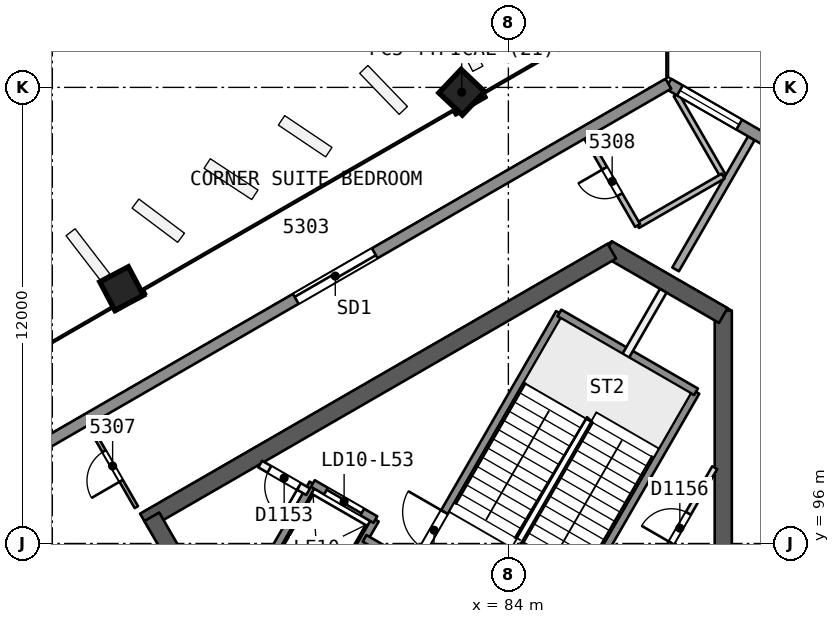
"""IFC4 building model, lengths in metres.
Left out: names, types, materials, properties, quantities, classifications, styles, units other than length and angle.
Written with IfcOpenShell. Run it as: python <this file> out.ifc"""

import sys

from ifc_helpers import new_model, si_unit, direction, frame, frame_2d, origin, origin_2d, place, context, subcontext, project, spatial, rectangle, extrude, element, fill, save


model = new_model("IFC4")
c1 = context("Model", 3, precision=1e-05, world=origin(), true_north=direction((0.0, 1.0)))
c2 = subcontext(c1, "Body", "Model", "MODEL_VIEW")
j1 = project(units=[si_unit("LENGTHUNIT", "METRE"), si_unit("PLANEANGLEUNIT", "RADIAN")], contexts=[c1])
p1 = place(None, origin())
s1 = spatial("IfcSite", under=j1, at=p1, CompositionType="ELEMENT")
p2 = place(p1, origin())
s2 = spatial("IfcBuilding", under=s1, at=p2, CompositionType="ELEMENT")
p3 = place(p2, frame((0.0, 0.0, 216.9)))
s3 = spatial("IfcBuildingStorey", under=s2, at=p3, CompositionType="ELEMENT", Elevation=216.9)
p4 = place(p3, frame((89.655, 88.019, 0.0), z_axis=(0.0, 0.0, 1.0), x_axis=(0.0, 1.0, 0.0)))
e1 = element("IfcWall", 1, at=p4, inside=s3, PredefinedType="SHEAR", context=c2, shape_type="SweptSolid", body=[
    extrude(rectangle(XDim=14.108, YDim=0.45, at=frame_2d((7.054, 0.0))), origin(), (0.0, 0.0, 1.0), 3.7),
])
p5 = place(p3, frame((89.655, 101.998, 0.0), z_axis=(0.0, 0.0, 1.0), x_axis=(-0.866042179588, 0.49997094233, 0.0)))
e2 = element("IfcWall", 2, at=p5, inside=s3, PredefinedType="SHEAR", context=c2, shape_type="SweptSolid", body=[
    extrude(rectangle(XDim=3.515, YDim=0.45, at=frame_2d((1.758, 0.0))), origin(), (0.0, 0.0, 1.0), 3.7),
])
p6 = place(p3, frame((86.723, 103.69, 0.0), z_axis=(0.0, 0.0, 1.0), x_axis=(-0.866022713978, -0.500004658852, 0.0)))
e3 = element("IfcWall", 3, at=p6, inside=s3, PredefinedType="SHEAR", context=c2, shape_type="SweptSolid", body=[
    extrude(rectangle(XDim=14.203, YDim=0.45, at=frame_2d((7.102, 0.0))), origin(), (0.0, 0.0, 1.0), 3.7),
])
p7 = place(p3, frame((74.617, 96.701, 0.0), z_axis=(0.0, 0.0, 1.0), x_axis=(0.499994385119, -0.866028645513, 0.0)))
e4 = element("IfcWall", 4, at=p7, inside=s3, PredefinedType="SHEAR", context=c2, shape_type="SweptSolid", body=[
    extrude(rectangle(XDim=10.155, YDim=0.45, at=frame_2d((5.077, 0.0))), origin(), (0.0, 0.0, 1.0), 3.7),
])
p8 = place(p7, frame((8.005, 0.0, 0.0)))
e5 = element("IfcOpeningElement", 5, at=p8, cuts=e4, PredefinedType="OPENING", context=c2, shape_type="SweptSolid", body=[
    extrude(rectangle(XDim=1.2, YDim=2.1, at=frame_2d((0.6, 1.05))), frame((0.0, 0.235, 0.0), z_axis=(0.0, -1.0, 0.0), x_axis=(1.0, 0.0, 0.0)), (0.0, 0.0, 1.0), 0.471),
])
p9 = place(p3, frame((91.743, 109.0, 0.0), z_axis=(-0.017605877014, -0.030464101799, 0.99938079409), x_axis=(0.86581098392, -0.500371202332, 2.456e-09)))
e6 = element("IfcColumn", 6, at=p9, inside=s3, PredefinedType="COLUMN", context=c2, shape_type="SweptSolid", body=[
    extrude(rectangle(XDim=1.9, YDim=1.9, at=origin_2d()), origin(), (0.0, 0.0, 1.0), 3.702),
])
p10 = place(p3, frame((82.783, 107.907, 0.0), z_axis=(-0.008375902173, -0.028161497857, 0.999568293966), x_axis=(0.865850883257, 0.499846917191, 0.021337931896)))
e7 = element("IfcColumn", 7, at=p10, inside=s3, PredefinedType="COLUMN", context=c2, shape_type="SweptSolid", body=[
    extrude(rectangle(XDim=0.85, YDim=0.85, at=origin_2d()), origin(), (0.0, 0.0, 1.0), 3.702),
])
p11 = place(p3, frame((73.822, 102.734, 0.0), z_axis=(0.000857522362, -0.02282328747, 0.99973914708), x_axis=(0.866054521305, 0.499835732571, 0.010668016277)))
e8 = element("IfcColumn", 8, at=p11, inside=s3, PredefinedType="COLUMN", context=c2, shape_type="SweptSolid", body=[
    extrude(rectangle(XDim=0.85, YDim=0.85, at=origin_2d()), origin(), (0.0, 0.0, 1.0), 3.701),
])
p12 = place(p3, frame((90.394, 106.663, 0.0), z_axis=(0.0, 0.0, 1.0), x_axis=(-0.49999285859, -0.86602952684, 0.0)))
e9 = element("IfcWall", 9, at=p12, inside=s3, PredefinedType="PARTITIONING", context=c2, shape_type="SweptSolid", body=[
    extrude(rectangle(XDim=3.986, YDim=0.2, at=frame_2d((1.993, 0.0))), origin(), (0.0, 0.0, 1.0), 3.3),
])
p13 = place(p3, frame((74.21, 96.956, 0.0), z_axis=(0.0, 0.0, 1.0), x_axis=(-0.499953629774, 0.866052173992, 0.0)))
e10 = element("IfcWall", 10, at=p13, inside=s3, PredefinedType="PARTITIONING", context=c2, shape_type="SweptSolid", body=[
    extrude(rectangle(XDim=2.499, YDim=0.1, at=frame_2d((1.25, 0.0))), origin(), (0.0, 0.0, 1.0), 3.3),
])
p14 = place(p13, frame((0.799, 0.0, 0.0)))
e11 = element("IfcOpeningElement", 11, at=p14, cuts=e10, PredefinedType="OPENING", context=c2, shape_type="SweptSolid", body=[
    extrude(rectangle(XDim=0.9, YDim=2.1, at=frame_2d((0.45, 1.05))), frame((0.0, 0.061, 0.0), z_axis=(0.0, -1.0, 0.0), x_axis=(1.0, 0.0, 0.0)), (0.0, 0.0, 1.0), 0.121),
])
p15 = place(p3, frame((67.831, 96.158, 0.0), z_axis=(0.0, 0.0, 1.0), x_axis=(0.500010879287, -0.866019122534, 0.0)))
e12 = element("IfcWall", 12, at=p15, inside=s3, PredefinedType="PARTITIONING", context=c2, shape_type="SweptSolid", body=[
    extrude(rectangle(XDim=10.478, YDim=0.2, at=frame_2d((5.239, 0.0))), origin(), (0.0, 0.0, 1.0), 3.3),
])
p16 = place(p3, frame((88.418, 107.804, 0.0), z_axis=(0.0, 0.0, 1.0), x_axis=(0.500010657777, -0.866019250426, 0.0)))
e13 = element("IfcWall", 13, at=p16, inside=s3, PredefinedType="PARTITIONING", context=c2, shape_type="SweptSolid", body=[
    extrude(rectangle(XDim=2.469, YDim=0.15, at=frame_2d((1.234, 0.0))), origin(), (0.0, 0.0, 1.0), 3.3),
])
p17 = place(p3, frame((89.652, 105.666, 0.0), z_axis=(0.0, 0.0, 1.0), x_axis=(-0.866021400173, -0.500006934395, 0.0)))
e14 = element("IfcWall", 14, at=p17, inside=s3, PredefinedType="PARTITIONING", context=c2, shape_type="SweptSolid", body=[
    extrude(rectangle(XDim=2.6, YDim=0.15, at=frame_2d((1.3, 0.0))), origin(), (0.0, 0.0, 1.0), 3.3),
])
p18 = place(p3, frame((87.4, 104.366, 0.0), z_axis=(0.0, 0.0, 1.0), x_axis=(-0.500014634633, 0.86601695431, 0.0)))
e15 = element("IfcWall", 15, at=p18, inside=s3, PredefinedType="PARTITIONING", context=c2, shape_type="SweptSolid", body=[
    extrude(rectangle(XDim=2.676, YDim=0.15, at=frame_2d((1.338, 0.0))), origin(), (0.0, 0.0, 1.0), 3.3),
])
p19 = place(p18, frame((0.938, 0.0, 0.0)))
e16 = element("IfcOpeningElement", 16, at=p19, cuts=e15, PredefinedType="OPENING", context=c2, shape_type="SweptSolid", body=[
    extrude(rectangle(XDim=0.8, YDim=2.1, at=frame_2d((0.4, 1.05))), frame((0.0, 0.085, 0.0), z_axis=(0.0, -1.0, 0.0), x_axis=(1.0, 0.0, 0.0)), (0.0, 0.0, 1.0), 0.171),
])
p20 = place(p3, frame((88.21, 108.096, 0.0), z_axis=(0.0, 0.0, 1.0), x_axis=(0.866045268016, -0.499965592563, 0.0)))
e17 = element("IfcWall", 17, at=p20, inside=s3, PredefinedType="SOLIDWALL", context=c2, shape_type="SweptSolid", body=[
    extrude(rectangle(XDim=5.215, YDim=0.3, at=frame_2d((2.607, 0.0))), origin(), (0.0, 0.0, 1.0), 3.3),
])
p21 = place(p20, frame((3.054, 0.0, 0.9)))
e18 = element("IfcOpeningElement", 18, at=p21, cuts=e17, PredefinedType="OPENING", context=c2, shape_type="SweptSolid", body=[
    extrude(rectangle(XDim=1.8, YDim=1.5, at=frame_2d((0.9, 0.75))), frame((0.0, 0.161, 0.0), z_axis=(0.0, -1.0, 0.0), x_axis=(1.0, 0.0, 0.0)), (0.0, 0.0, 1.0), 0.321),
])
p22 = place(p20, frame((0.351, 0.0, 0.9)))
e19 = element("IfcOpeningElement", 19, at=p22, cuts=e17, PredefinedType="OPENING", context=c2, shape_type="SweptSolid", body=[
    extrude(rectangle(XDim=1.8, YDim=1.5, at=frame_2d((0.9, 0.75))), frame((0.0, 0.161, 0.0), z_axis=(0.0, -1.0, 0.0), x_axis=(1.0, 0.0, 0.0)), (0.0, 0.0, 1.0), 0.321),
])
p23 = place(p3, frame((44.063, 82.607, 0.0), z_axis=(0.0, 0.0, 1.0), x_axis=(0.866024402399, 0.500001734447, 0.0)))
e20 = element("IfcWall", 20, at=p23, inside=s3, PredefinedType="SOLIDWALL", context=c2, shape_type="SweptSolid", body=[
    extrude(rectangle(XDim=50.977, YDim=0.3, at=frame_2d((25.488, 0.0))), origin(), (0.0, 0.0, 1.0), 3.3),
])
p24 = place(p23, frame((24.444, 0.0, 0.0)))
e21 = element("IfcOpeningElement", 21, at=p24, cuts=e20, PredefinedType="OPENING", context=c2, shape_type="SweptSolid", body=[
    extrude(rectangle(XDim=2.4, YDim=2.4, at=frame_2d((1.2, 1.2))), frame((0.0, 0.161, 0.0), z_axis=(0.0, -1.0, 0.0), x_axis=(1.0, 0.0, 0.0)), (0.0, 0.0, 1.0), 0.321),
])
p25 = place(p23, frame((29.121, 0.0, 0.0)))
e22 = element("IfcOpeningElement", 22, at=p25, cuts=e20, PredefinedType="OPENING", context=c2, shape_type="SweptSolid", body=[
    extrude(rectangle(XDim=2.4, YDim=2.4, at=frame_2d((1.2, 1.2))), frame((0.0, 0.161, 0.0), z_axis=(0.0, -1.0, 0.0), x_axis=(1.0, 0.0, 0.0)), (0.0, 0.0, 1.0), 0.321),
])
p26 = place(p23, frame((39.656, 0.0, 0.0)))
e23 = element("IfcOpeningElement", 23, at=p26, cuts=e20, PredefinedType="OPENING", context=c2, shape_type="SweptSolid", body=[
    extrude(rectangle(XDim=2.4, YDim=2.4, at=frame_2d((1.2, 1.2))), frame((0.0, 0.161, 0.0), z_axis=(0.0, -1.0, 0.0), x_axis=(1.0, 0.0, 0.0)), (0.0, 0.0, 1.0), 0.321),
])
p27 = place(p23, frame((19.612, 0.0, 0.0)))
e24 = element("IfcOpeningElement", 24, at=p27, cuts=e20, PredefinedType="OPENING", context=c2, shape_type="SweptSolid", body=[
    extrude(rectangle(XDim=2.4, YDim=2.4, at=frame_2d((1.2, 1.2))), frame((0.0, 0.161, 0.0), z_axis=(0.0, -1.0, 0.0), x_axis=(1.0, 0.0, 0.0)), (0.0, 0.0, 1.0), 0.321),
])
p28 = place(p23, frame((8.885, 0.0, 0.0)))
e25 = element("IfcOpeningElement", 25, at=p28, cuts=e20, PredefinedType="OPENING", context=c2, shape_type="SweptSolid", body=[
    extrude(rectangle(XDim=2.4, YDim=2.4, at=frame_2d((1.2, 1.2))), frame((0.0, 0.161, 0.0), z_axis=(0.0, -1.0, 0.0), x_axis=(1.0, 0.0, 0.0)), (0.0, 0.0, 1.0), 0.321),
])
p29 = place(p3, frame((87.621, 94.86, 0.0), z_axis=(0.0, 0.0, 1.0), x_axis=(0.499993116331, 0.866029378036, 0.0)))
e26 = element("IfcWall", 26, at=p29, inside=s3, PredefinedType="PARTITIONING", context=c2, shape_type="SweptSolid", body=[
    extrude(rectangle(XDim=3.618, YDim=0.15, at=frame_2d((1.809, 0.0))), origin(), (0.0, 0.0, 1.0), 3.3),
])
p30 = place(p29, frame((1.332, 0.0, 0.0)))
e27 = element("IfcOpeningElement", 27, at=p30, cuts=e26, PredefinedType="OPENING", context=c2, shape_type="SweptSolid", body=[
    extrude(rectangle(XDim=0.9, YDim=2.1, at=frame_2d((0.45, 1.05))), frame((0.0, 0.085, 0.0), z_axis=(0.0, -1.0, 0.0), x_axis=(1.0, 0.0, 0.0)), (0.0, 0.0, 1.0), 0.171),
])
p31 = place(p3, frame((85.087, 93.321, 0.0), z_axis=(0.0, 0.0, 1.0), x_axis=(0.500019787375, 0.866013979237, 0.0)))
e28 = element("IfcWall", 28, at=p31, inside=s3, PredefinedType="SOLIDWALL", context=c2, shape_type="SweptSolid", body=[
    extrude(rectangle(XDim=7.7, YDim=0.2, at=frame_2d((3.85, 0.0))), origin(), (0.0, 0.0, 1.0), 3.3),
])
p32 = place(p3, frame((87.09, 100.94, 0.0), z_axis=(0.0, 0.0, 1.0), x_axis=(0.500011643316, 0.866018681408, 0.0)))
e29 = element("IfcWall", 29, at=p32, inside=s3, PredefinedType="PARTITIONING", context=c2, shape_type="SweptSolid", body=[
    extrude(rectangle(XDim=1.973, YDim=0.2, at=frame_2d((0.987, 0.0))), origin(), (0.0, 0.0, 1.0), 3.3),
])
p33 = place(p3, frame((81.493, 95.396, 0.0), z_axis=(0.0, 0.0, 1.0), x_axis=(0.500006057782, 0.866021906294, 0.0)))
e30 = element("IfcWall", 30, at=p33, inside=s3, PredefinedType="SOLIDWALL", context=c2, shape_type="SweptSolid", body=[
    extrude(rectangle(XDim=7.7, YDim=0.2, at=frame_2d((3.85, 0.0))), origin(), (0.0, 0.0, 1.0), 3.3),
])
p34 = place(p33, frame((0.55, 0.0, 0.0)))
e31 = element("IfcOpeningElement", 31, at=p34, cuts=e30, PredefinedType="OPENING", context=c2, shape_type="SweptSolid", body=[
    extrude(rectangle(XDim=1.1, YDim=2.1, at=frame_2d((0.55, 1.05))), frame((0.0, 0.11, 0.0), z_axis=(0.0, -1.0, 0.0), x_axis=(1.0, 0.0, 0.0)), (0.0, 0.0, 1.0), 0.221),
])
for number, where, z_axis, x_axis in (
    (32, (78.976, 93.986, 0.0), (0.0, 0.0, 1.0), (0.5, 0.866, 0.0)),
    (33, (77.33, 94.936, 0.0), (0.0, 0.0, 1.0), (0.5, 0.866, 0.0)),
):
    element("IfcWall", number, at=place(p3, frame(where, z_axis=z_axis, x_axis=x_axis)), inside=s3, PredefinedType="SOLIDWALL", context=c2, shape_type="SweptSolid", body=[
        extrude(rectangle(XDim=3.05, YDim=0.2, at=frame_2d((1.525, 0.0))), origin(), (0.0, 0.0, 1.0), 3.3),
    ])
p35 = place(p3, frame((89.43, 90.814, 0.0), z_axis=(0.0, 0.0, 1.0), x_axis=(-0.866018983788, 0.500011119594, 0.0)))
e34 = element("IfcWall", 34, at=p35, inside=s3, PredefinedType="SOLIDWALL", context=c2, shape_type="SweptSolid", body=[
    extrude(rectangle(XDim=10.64, YDim=0.2, at=frame_2d((5.32, 0.0))), origin(), (0.0, 0.0, 1.0), 3.3),
])
p36 = place(p35, frame((0.37, 0.0, 0.0)))
e35 = element("IfcOpeningElement", 35, at=p36, cuts=e34, PredefinedType="OPENING", context=c2, shape_type="SweptSolid", body=[
    extrude(rectangle(XDim=0.9, YDim=2.1, at=frame_2d((0.45, 1.05))), frame((0.0, 0.11, 0.0), z_axis=(0.0, -1.0, 0.0), x_axis=(1.0, 0.0, 0.0)), (0.0, 0.0, 1.0), 0.221),
])
p37 = place(p3, frame((78.73, 97.361, 0.0), z_axis=(0.0, 0.0, 1.0), x_axis=(-0.866045896294, 0.499964504253, 0.0)))
e36 = element("IfcWall", 36, at=p37, inside=s3, PredefinedType="PARTITIONING", context=c2, shape_type="SweptSolid", body=[
    extrude(rectangle(XDim=1.455, YDim=0.2, at=frame_2d((0.728, 0.0))), origin(), (0.0, 0.0, 1.0), 3.3),
])
p38 = place(p37, frame((0.278, 0.0, 0.0)))
e37 = element("IfcOpeningElement", 37, at=p38, cuts=e36, PredefinedType="OPENING", context=c2, shape_type="SweptSolid", body=[
    extrude(rectangle(XDim=0.9, YDim=2.1, at=frame_2d((0.45, 1.05))), frame((0.0, 0.11, 0.0), z_axis=(0.0, -1.0, 0.0), x_axis=(1.0, 0.0, 0.0)), (0.0, 0.0, 1.0), 0.221),
])
p39 = place(p3, frame((80.5, 96.627, 0.0), z_axis=(0.0, 0.0, 1.0), x_axis=(-0.86601224135, 0.500022797313, 0.0)))
e38 = element("IfcWall", 38, at=p39, inside=s3, PredefinedType="SOLIDWALL", context=c2, shape_type="SweptSolid", body=[
    extrude(rectangle(XDim=1.9, YDim=0.2, at=frame_2d((0.95, 0.0))), origin(), (0.0, 0.0, 1.0), 3.3),
])
p40 = place(p39, frame((0.4, 0.0, 0.0)))
e39 = element("IfcOpeningElement", 39, at=p40, cuts=e38, PredefinedType="OPENING", context=c2, shape_type="SweptSolid", body=[
    extrude(rectangle(XDim=1.1, YDim=2.1, at=frame_2d((0.55, 1.05))), frame((0.0, 0.11, 0.0), z_axis=(0.0, -1.0, 0.0), x_axis=(1.0, 0.0, 0.0)), (0.0, 0.0, 1.0), 0.221),
])
p41 = place(p3, frame((88.937, 99.99, 0.0), z_axis=(0.0, 0.0, 1.0), x_axis=(-0.866004344652, 0.500036473714, 0.0)))
e40 = element("IfcWall", 40, at=p41, inside=s3, PredefinedType="SOLIDWALL", context=c2, shape_type="SweptSolid", body=[
    extrude(rectangle(XDim=4.15, YDim=0.2, at=frame_2d((2.075, 0.0))), origin(), (0.0, 0.0, 1.0), 3.3),
])
p42 = place(p14, origin())
e41 = element("IfcDoor", 41, at=p42, inside=s3, OperationType="SINGLE_SWING_LEFT", PredefinedType="NOTDEFINED", context=c2, shape_type="SweptSolid", body=[
    extrude(rectangle(XDim=0.9, YDim=2.1, at=frame_2d((0.45, 1.05))), frame((0.0, 0.025, 0.0), z_axis=(0.0, -1.0, 0.0), x_axis=(1.0, 0.0, 0.0)), (0.0, 0.0, 1.0), 0.05),
])
fill(e11, e41)
p43 = place(p19, origin())
e42 = element("IfcDoor", 42, at=p43, inside=s3, OperationType="SINGLE_SWING_RIGHT", PredefinedType="NOTDEFINED", context=c2, shape_type="SweptSolid", body=[
    extrude(rectangle(XDim=0.8, YDim=2.1, at=frame_2d((0.4, 1.05))), frame((0.0, 0.025, 0.0), z_axis=(0.0, -1.0, 0.0), x_axis=(1.0, 0.0, 0.0)), (0.0, 0.0, 1.0), 0.05),
])
fill(e16, e42)
p44 = place(p22, origin())
e43 = element("IfcWindow", 43, at=p44, inside=s3, PartitioningType="SINGLE_PANEL", PredefinedType="WINDOW", context=c2, shape_type="SweptSolid", body=[
    extrude(rectangle(XDim=1.8, YDim=1.5, at=frame_2d((0.9, 0.75))), frame((0.0, 0.03, 0.0), z_axis=(0.0, -1.0, 0.0), x_axis=(1.0, 0.0, 0.0)), (0.0, 0.0, 1.0), 0.06),
])
fill(e19, e43)
p45 = place(p26, origin())
e44 = element("IfcDoor", 44, at=p45, inside=s3, OperationType="SLIDING_TO_LEFT", PredefinedType="NOTDEFINED", context=c2, shape_type="SweptSolid", body=[
    extrude(rectangle(XDim=2.4, YDim=2.4, at=frame_2d((1.2, 1.2))), frame((0.0, 0.025, 0.0), z_axis=(0.0, -1.0, 0.0), x_axis=(1.0, 0.0, 0.0)), (0.0, 0.0, 1.0), 0.05),
])
fill(e23, e44)
p46 = place(p40, origin())
e45 = element("IfcDoor", 45, at=p46, inside=s3, OperationType="SLIDING_TO_RIGHT", PredefinedType="NOTDEFINED", context=c2, shape_type="SweptSolid", body=[
    extrude(rectangle(XDim=1.1, YDim=2.1, at=frame_2d((0.55, 1.05))), frame((0.0, 0.025, 0.0), z_axis=(0.0, -1.0, 0.0), x_axis=(1.0, 0.0, 0.0)), (0.0, 0.0, 1.0), 0.05),
])
fill(e39, e45)
p47 = place(p38, origin())
e46 = element("IfcDoor", 46, at=p47, inside=s3, OperationType="SINGLE_SWING_LEFT", PredefinedType="NOTDEFINED", context=c2, shape_type="SweptSolid", body=[
    extrude(rectangle(XDim=0.9, YDim=2.1, at=frame_2d((0.45, 1.05))), frame((0.0, 0.025, 0.0), z_axis=(0.0, -1.0, 0.0), x_axis=(1.0, 0.0, 0.0)), (0.0, 0.0, 1.0), 0.05),
])
fill(e37, e46)
p48 = place(p34, origin())
e47 = element("IfcDoor", 47, at=p48, inside=s3, OperationType="SINGLE_SWING_RIGHT", PredefinedType="NOTDEFINED", context=c2, shape_type="SweptSolid", body=[
    extrude(rectangle(XDim=1.1, YDim=2.1, at=frame_2d((0.55, 1.05))), frame((0.0, 0.025, 0.0), z_axis=(0.0, -1.0, 0.0), x_axis=(1.0, 0.0, 0.0)), (0.0, 0.0, 1.0), 0.05),
])
fill(e31, e47)
p49 = place(p30, origin())
e48 = element("IfcDoor", 48, at=p49, inside=s3, OperationType="SINGLE_SWING_LEFT", PredefinedType="NOTDEFINED", context=c2, shape_type="SweptSolid", body=[
    extrude(rectangle(XDim=0.9, YDim=2.1, at=frame_2d((0.45, 1.05))), frame((0.0, 0.025, 0.0), z_axis=(0.0, -1.0, 0.0), x_axis=(1.0, 0.0, 0.0)), (0.0, 0.0, 1.0), 0.05),
])
fill(e27, e48)
save(model, sys.argv[1])
